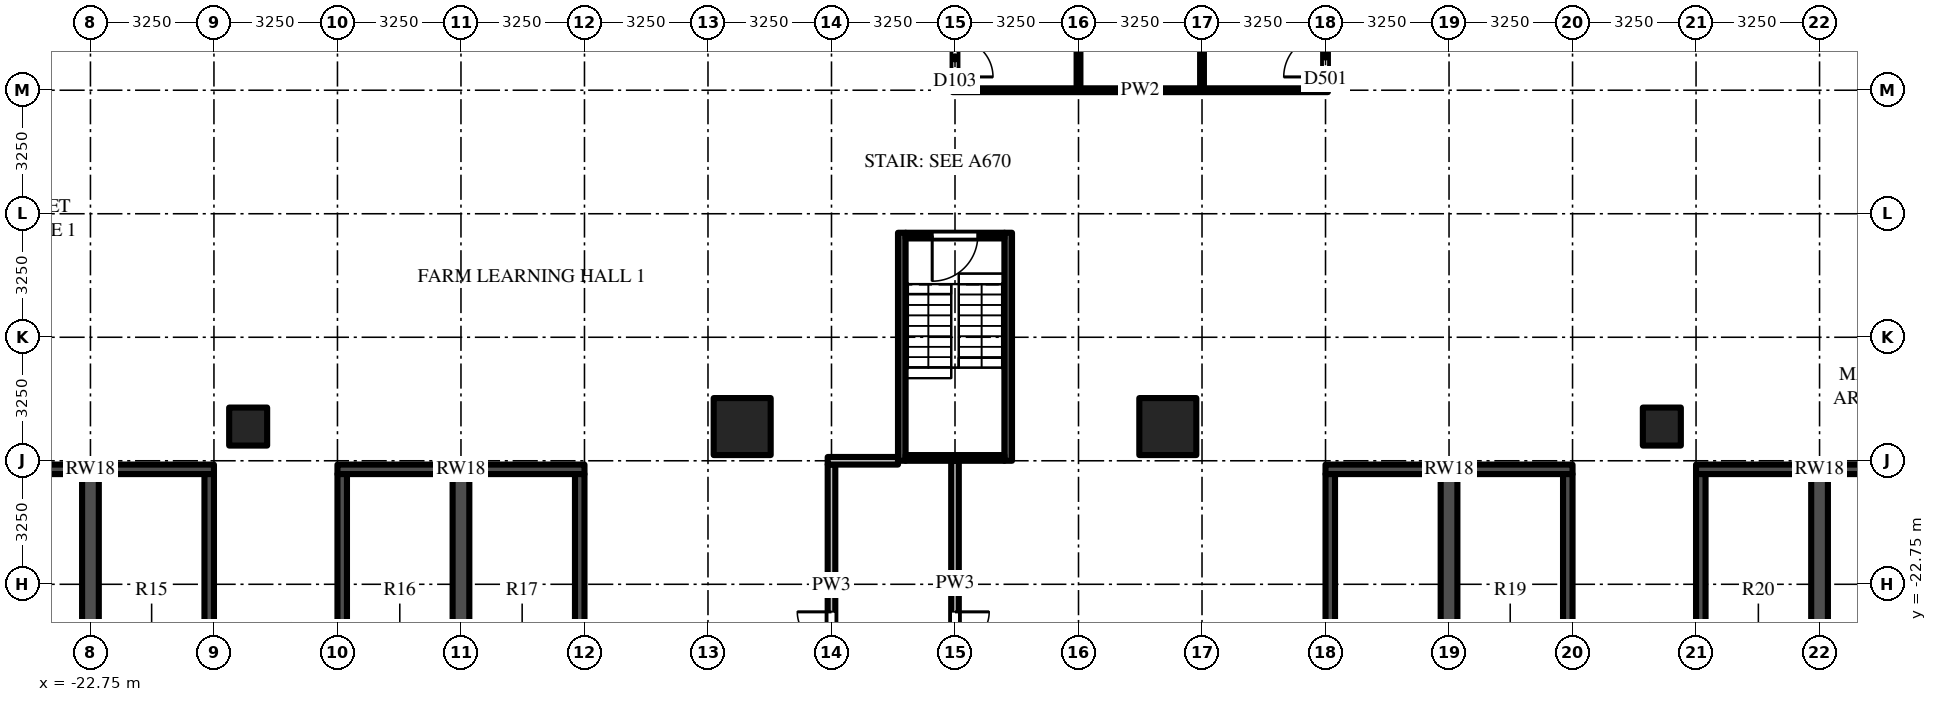
"""IFC4 building model, lengths in metres.
Left out: names, types, materials, properties, quantities, classifications, styles, units other than length and angle.
Written with IfcOpenShell. Run it as: python <this file> out.ifc"""

import sys

from ifc_helpers import new_model, si_unit, direction, frame, frame_2d, origin, origin_2d, place, context, subcontext, project, spatial, rectangle, extrude, source, transform, mapped, element, fill, save


model = new_model("IFC4")
c1 = context("Model", 3, precision=1e-05, world=origin(), true_north=direction((0.0, 1.0)))
c2 = subcontext(c1, "Body", "Model", "MODEL_VIEW")
j1 = project(units=[si_unit("LENGTHUNIT", "METRE"), si_unit("PLANEANGLEUNIT", "RADIAN")], contexts=[c1])
p1 = place(None, origin())
s1 = spatial("IfcSite", under=j1, at=p1, CompositionType="ELEMENT")
p2 = place(p1, origin())
s2 = spatial("IfcBuilding", under=s1, at=p2, CompositionType="ELEMENT")
p3 = place(p2, frame((0.0, 0.0, 29.0)))
s3 = spatial("IfcBuildingStorey", under=s2, at=p3, CompositionType="ELEMENT", Elevation=29.0)
m1 = source(origin(), c2, "Body", "SweptSolid", [
    extrude(rectangle(XDim=1.5, YDim=1.5, at=origin_2d()), origin(), (0.0, 0.0, 1.0), 5.0),
])
p4 = place(p3, frame((5.6, -18.6, 0.0), z_axis=(0.0, 0.0, 1.0), x_axis=(1.0, 0.0, 0.0)))
e1 = element("IfcColumn", 1, at=p4, inside=s3, PredefinedType="COLUMN", context=c2, shape_type="MappedRepresentation", body=[
    mapped(m1, transform((0.0, 0.0, 0.0))),
])
m2 = source(origin(), c2, "Body", "SweptSolid", [
    extrude(rectangle(XDim=1.0, YDim=1.0, at=origin_2d()), origin(), (0.0, 0.0, 1.0), 5.0),
])
p5 = place(p3, frame((18.6, -18.6, 0.0), z_axis=(0.0, 0.0, 1.0), x_axis=(1.0, 0.0, 0.0)))
e2 = element("IfcColumn", 2, at=p5, inside=s3, PredefinedType="COLUMN", context=c2, shape_type="MappedRepresentation", body=[
    mapped(m2, transform((0.0, 0.0, 0.0))),
])
p6 = place(p3, frame((-5.6, -18.6, 0.0), z_axis=(0.0, 0.0, 1.0), x_axis=(1.0, 0.0, 0.0)))
e3 = element("IfcColumn", 3, at=p6, inside=s3, PredefinedType="COLUMN", context=c2, shape_type="MappedRepresentation", body=[
    mapped(m1, transform((0.0, 0.0, 0.0))),
])
p7 = place(p3, frame((-18.6, -18.6, 0.0), z_axis=(0.0, 0.0, 1.0), x_axis=(1.0, 0.0, 0.0)))
e4 = element("IfcColumn", 4, at=p7, inside=s3, PredefinedType="COLUMN", context=c2, shape_type="MappedRepresentation", body=[
    mapped(m2, transform((0.0, 0.0, 0.0))),
])
m3 = source(origin(), c2, "Body", "SweptSolid", [
    extrude(rectangle(XDim=6.0, YDim=0.2, at=frame_2d((3.0, 0.0))), origin(), (0.0, 0.0, 1.0), 4.65),
])
for number, where, z_axis, x_axis in (
    (5, (1.4, -13.5, 0.0), (0.0, 0.0, 1.0), (0.0, -1.0, 0.0)),
    (6, (-1.4, -13.5, 0.0), (0.0, 0.0, 1.0), (0.0, -1.0, 0.0)),
):
    element("IfcWall", number, at=place(p3, frame(where, z_axis=z_axis, x_axis=x_axis)), inside=s3, PredefinedType="SHEAR", context=c2, shape_type="MappedRepresentation", body=[
        mapped(m3, transform((0.0, 0.0, 0.0))),
    ])
m4 = source(origin(), c2, "Body", "SweptSolid", [
    extrude(rectangle(XDim=2.6, YDim=0.15, at=frame_2d((1.3, 0.0))), origin(), (0.0, 0.0, 1.0), 4.65),
])
p8 = place(p3, frame((1.3, -13.575, 0.0), z_axis=(0.0, 0.0, 1.0), x_axis=(-1.0, 0.0, 0.0)))
e7 = element("IfcWall", 7, at=p8, inside=s3, PredefinedType="SHEAR", context=c2, shape_type="MappedRepresentation", body=[
    mapped(m4, transform((0.0, 0.0, 0.0))),
])
m5 = source(origin(), c2, "Body", "SweptSolid", [
    extrude(rectangle(XDim=1.2, YDim=2.1, at=frame_2d((0.6, 1.05))), frame((0.0, 0.085, 0.0), z_axis=(0.0, -1.0, 0.0), x_axis=(1.0, 0.0, 0.0)), (0.0, 0.0, 1.0), 0.17),
])
p9 = place(p8, frame((0.7, 0.0, 0.0)))
e8 = element("IfcOpeningElement", 8, at=p9, cuts=e7, PredefinedType="OPENING", context=c2, shape_type="MappedRepresentation", body=[
    mapped(m5, transform((0.0, 0.0, 0.0))),
])
p10 = place(p3, frame((1.3, -19.425, 0.0), z_axis=(0.0, 0.0, 1.0), x_axis=(-1.0, 0.0, 0.0)))
e9 = element("IfcWall", 9, at=p10, inside=s3, PredefinedType="SHEAR", context=c2, shape_type="MappedRepresentation", body=[
    mapped(m4, transform((0.0, 0.0, 0.0))),
])
m6 = source(origin(), c2, "Body", "SweptSolid", [
    extrude(rectangle(XDim=6.5, YDim=0.25, at=frame_2d((3.25, 0.0))), origin(), (0.0, 0.0, 1.0), 4.65),
])
p11 = place(p3, frame((-26.0, -19.725, 0.0), z_axis=(0.0, 0.0, 1.0), x_axis=(1.0, 0.0, 0.0)))
e10 = element("IfcWall", 10, at=p11, inside=s3, PredefinedType="SHEAR", context=c2, shape_type="MappedRepresentation", body=[
    mapped(m6, transform((0.0, 0.0, 0.0))),
])
m7 = source(origin(), c2, "Body", "SweptSolid", [
    extrude(rectangle(XDim=8.3, YDim=0.25, at=frame_2d((4.15, 0.0))), origin(), (0.0, 0.0, 1.0), 4.65),
])
p12 = place(p3, frame((-19.625, -28.15, 0.0), z_axis=(0.0, 0.0, 1.0), x_axis=(0.0, 1.0, 0.0)))
e11 = element("IfcWall", 11, at=p12, inside=s3, PredefinedType="SHEAR", context=c2, shape_type="MappedRepresentation", body=[
    mapped(m7, transform((0.0, 0.0, 0.0))),
])
m8 = source(origin(), c2, "Body", "SweptSolid", [
    extrude(rectangle(XDim=8.3, YDim=0.44, at=frame_2d((4.15, 0.0))), origin(), (0.0, 0.0, 1.0), 4.65),
])
p13 = place(p3, frame((-22.75, -28.15, 0.0), z_axis=(0.0, 0.0, 1.0), x_axis=(0.0, 1.0, 0.0)))
e12 = element("IfcWall", 12, at=p13, inside=s3, PredefinedType="SHEAR", context=c2, shape_type="MappedRepresentation", body=[
    mapped(m8, transform((0.0, 0.0, 0.0))),
])
p14 = place(p3, frame((-16.25, -19.725, 0.0), z_axis=(0.0, 0.0, 1.0), x_axis=(1.0, 0.0, 0.0)))
e13 = element("IfcWall", 13, at=p14, inside=s3, PredefinedType="SHEAR", context=c2, shape_type="MappedRepresentation", body=[
    mapped(m6, transform((0.0, 0.0, 0.0))),
])
for number, where, z_axis, x_axis in (
    (14, (-16.125, -28.15, 0.0), (0.0, 0.0, 1.0), (0.0, 1.0, 0.0)),
    (15, (-9.875, -28.15, 0.0), (0.0, 0.0, 1.0), (0.0, 1.0, 0.0)),
):
    element("IfcWall", number, at=place(p3, frame(where, z_axis=z_axis, x_axis=x_axis)), inside=s3, PredefinedType="SHEAR", context=c2, shape_type="MappedRepresentation", body=[
        mapped(m7, transform((0.0, 0.0, 0.0))),
    ])
p15 = place(p3, frame((-13.0, -28.15, 0.0), z_axis=(0.0, 0.0, 1.0), x_axis=(0.0, 1.0, 0.0)))
e16 = element("IfcWall", 16, at=p15, inside=s3, PredefinedType="SHEAR", context=c2, shape_type="MappedRepresentation", body=[
    mapped(m8, transform((0.0, 0.0, 0.0))),
])
p16 = place(p3, frame((9.75, -19.725, 0.0), z_axis=(0.0, 0.0, 1.0), x_axis=(1.0, 0.0, 0.0)))
e17 = element("IfcWall", 17, at=p16, inside=s3, PredefinedType="SHEAR", context=c2, shape_type="MappedRepresentation", body=[
    mapped(m6, transform((0.0, 0.0, 0.0))),
])
for number, where, z_axis, x_axis in (
    (18, (9.875, -28.15, 0.0), (0.0, 0.0, 1.0), (0.0, 1.0, 0.0)),
    (19, (16.125, -28.15, 0.0), (0.0, 0.0, 1.0), (0.0, 1.0, 0.0)),
):
    element("IfcWall", number, at=place(p3, frame(where, z_axis=z_axis, x_axis=x_axis)), inside=s3, PredefinedType="SHEAR", context=c2, shape_type="MappedRepresentation", body=[
        mapped(m7, transform((0.0, 0.0, 0.0))),
    ])
p17 = place(p3, frame((13.0, -28.15, 0.0), z_axis=(0.0, 0.0, 1.0), x_axis=(0.0, 1.0, 0.0)))
e20 = element("IfcWall", 20, at=p17, inside=s3, PredefinedType="SHEAR", context=c2, shape_type="MappedRepresentation", body=[
    mapped(m8, transform((0.0, 0.0, 0.0))),
])
p18 = place(p3, frame((19.5, -19.725, 0.0), z_axis=(0.0, 0.0, 1.0), x_axis=(1.0, 0.0, 0.0)))
e21 = element("IfcWall", 21, at=p18, inside=s3, PredefinedType="SHEAR", context=c2, shape_type="MappedRepresentation", body=[
    mapped(m6, transform((0.0, 0.0, 0.0))),
])
p19 = place(p3, frame((19.625, -28.15, 0.0), z_axis=(0.0, 0.0, 1.0), x_axis=(0.0, 1.0, 0.0)))
e22 = element("IfcWall", 22, at=p19, inside=s3, PredefinedType="SHEAR", context=c2, shape_type="MappedRepresentation", body=[
    mapped(m7, transform((0.0, 0.0, 0.0))),
])
p20 = place(p3, frame((22.75, -28.15, 0.0), z_axis=(0.0, 0.0, 1.0), x_axis=(0.0, 1.0, 0.0)))
e23 = element("IfcWall", 23, at=p20, inside=s3, PredefinedType="SHEAR", context=c2, shape_type="MappedRepresentation", body=[
    mapped(m8, transform((0.0, 0.0, 0.0))),
])
m9 = source(origin(), c2, "Body", "SweptSolid", [
    extrude(rectangle(XDim=3.188, YDim=0.2, at=frame_2d((1.594, 0.0))), origin(), (0.0, 0.0, 1.0), 4.65),
])
p21 = place(p3, frame((-3.25, -25.938, 0.0), z_axis=(0.0, 0.0, 1.0), x_axis=(0.0, 1.0, 0.0)))
e24 = element("IfcWall", 24, at=p21, inside=s3, PredefinedType="PARTITIONING", context=c2, shape_type="MappedRepresentation", body=[
    mapped(m9, transform((0.0, 0.0, 0.0))),
])
m10 = source(origin(), c2, "Body", "SweptSolid", [
    extrude(rectangle(XDim=1.8, YDim=2.1, at=frame_2d((0.9, 1.05))), frame((0.0, 0.11, 0.0), z_axis=(0.0, -1.0, 0.0), x_axis=(1.0, 0.0, 0.0)), (0.0, 0.0, 1.0), 0.22),
])
p22 = place(p21, frame((0.663, 0.0, 0.0)))
e25 = element("IfcOpeningElement", 25, at=p22, cuts=e24, PredefinedType="OPENING", context=c2, shape_type="MappedRepresentation", body=[
    mapped(m10, transform((0.0, 0.0, 0.0))),
])
m11 = source(origin(), c2, "Body", "SweptSolid", [
    extrude(rectangle(XDim=3.15, YDim=0.2, at=frame_2d((1.575, 0.0))), origin(), (0.0, 0.0, 1.0), 4.65),
])
p23 = place(p3, frame((-3.25, -22.75, 0.0), z_axis=(0.0, 0.0, 1.0), x_axis=(0.0, 1.0, 0.0)))
e26 = element("IfcWall", 26, at=p23, inside=s3, PredefinedType="PARTITIONING", context=c2, shape_type="MappedRepresentation", body=[
    mapped(m11, transform((0.0, 0.0, 0.0))),
])
m12 = source(origin(), c2, "Body", "SweptSolid", [
    extrude(rectangle(XDim=3.188, YDim=0.2, at=frame_2d((1.594, 0.0))), origin(), (0.0, 0.0, 1.0), 3.947),
])
p24 = place(p3, frame((0.0, -22.75, 0.0), z_axis=(0.0, 0.0, 1.0), x_axis=(0.0, -1.0, 0.0)))
e27 = element("IfcWall", 27, at=p24, inside=s3, PredefinedType="PARTITIONING", context=c2, shape_type="MappedRepresentation", body=[
    mapped(m12, transform((0.0, 0.0, 0.0))),
])
p25 = place(p24, frame((0.725, 0.0, 0.0)))
e28 = element("IfcOpeningElement", 28, at=p25, cuts=e27, PredefinedType="OPENING", context=c2, shape_type="MappedRepresentation", body=[
    mapped(m10, transform((0.0, 0.0, 0.0))),
])
m13 = source(origin(), c2, "Body", "SweptSolid", [
    extrude(rectangle(XDim=3.25, YDim=0.2, at=frame_2d((1.625, 0.0))), origin(), (0.0, 0.0, 1.0), 3.947),
])
p26 = place(p3, frame((0.0, -22.75, 0.0), z_axis=(0.0, 0.0, 1.0), x_axis=(0.0, 1.0, 0.0)))
e29 = element("IfcWall", 29, at=p26, inside=s3, PredefinedType="PARTITIONING", context=c2, shape_type="MappedRepresentation", body=[
    mapped(m13, transform((0.0, 0.0, 0.0))),
])
p27 = place(p3, frame((0.0, -6.562, 0.0), z_axis=(0.0, 0.0, 1.0), x_axis=(0.0, -1.0, 0.0)))
e30 = element("IfcWall", 30, at=p27, inside=s3, PredefinedType="PARTITIONING", context=c2, shape_type="SweptSolid", body=[
    extrude(rectangle(XDim=3.137, YDim=0.125, at=frame_2d((1.569, 0.0))), origin(), (0.0, 0.0, 1.0), 4.027),
])
m14 = source(origin(), c2, "Body", "SweptSolid", [
    extrude(rectangle(XDim=1.0, YDim=2.1, at=frame_2d((0.5, 1.05))), frame((0.0, 0.073, 0.0), z_axis=(0.0, -1.0, 0.0), x_axis=(1.0, 0.0, 0.0)), (0.0, 0.0, 1.0), 0.145),
])
p28 = place(p27, frame((1.837, 0.0, 0.0)))
e31 = element("IfcOpeningElement", 31, at=p28, cuts=e30, PredefinedType="OPENING", context=c2, shape_type="MappedRepresentation", body=[
    mapped(m14, transform((0.0, 0.0, 0.0))),
])
p29 = place(p3, frame((3.25, -9.7, 0.0), z_axis=(0.0, 0.0, 1.0), x_axis=(0.0, 1.0, 0.0)))
e32 = element("IfcWall", 32, at=p29, inside=s3, PredefinedType="PARTITIONING", context=c2, shape_type="SweptSolid", body=[
    extrude(rectangle(XDim=3.137, YDim=0.1, at=frame_2d((1.569, 0.0))), origin(), (0.0, 0.0, 1.0), 4.65),
])
p30 = place(p3, frame((6.5, -9.7, 0.0), z_axis=(0.0, 0.0, 1.0), x_axis=(0.0, 1.0, 0.0)))
e33 = element("IfcWall", 33, at=p30, inside=s3, PredefinedType="PARTITIONING", context=c2, shape_type="SweptSolid", body=[
    extrude(rectangle(XDim=3.137, YDim=0.1, at=frame_2d((1.569, 0.0))), origin(), (0.0, 0.0, 1.0), 3.947),
])
p31 = place(p3, frame((9.75, -9.7, 0.0), z_axis=(0.0, 0.0, 1.0), x_axis=(0.0, 1.0, 0.0)))
e34 = element("IfcWall", 34, at=p31, inside=s3, PredefinedType="PARTITIONING", context=c2, shape_type="SweptSolid", body=[
    extrude(rectangle(XDim=3.2, YDim=0.125, at=frame_2d((1.6, 0.0))), origin(), (0.0, 0.0, 1.0), 3.947),
])
m15 = source(origin(), c2, "Body", "SweptSolid", [
    extrude(rectangle(XDim=1.1, YDim=2.1, at=frame_2d((0.55, 1.05))), frame((0.0, 0.073, 0.0), z_axis=(0.0, -1.0, 0.0), x_axis=(1.0, 0.0, 0.0)), (0.0, 0.0, 1.0), 0.145),
])
p32 = place(p31, frame((0.3, 0.0, 0.0)))
e35 = element("IfcOpeningElement", 35, at=p32, cuts=e34, PredefinedType="OPENING", context=c2, shape_type="MappedRepresentation", body=[
    mapped(m15, transform((0.0, 0.0, 0.0))),
])
m16 = source(origin(), c2, "Body", "SweptSolid", [
    extrude(rectangle(XDim=1.85, YDim=0.2, at=frame_2d((0.925, 0.0))), origin(), (0.0, 0.0, 1.0), 3.947),
])
p33 = place(p3, frame((-3.35, -19.5, 0.0), z_axis=(0.0, 0.0, 1.0), x_axis=(1.0, 0.0, 0.0)))
e36 = element("IfcWall", 36, at=p33, inside=s3, PredefinedType="PARTITIONING", context=c2, shape_type="MappedRepresentation", body=[
    mapped(m16, transform((0.0, 0.0, 0.0))),
])
p34 = place(p3, frame((-0.062, -9.75, 0.0), z_axis=(0.0, 0.0, 1.0), x_axis=(1.0, 0.0, 0.0)))
e37 = element("IfcWall", 37, at=p34, inside=s3, PredefinedType="PARTITIONING", context=c2, shape_type="SweptSolid", body=[
    extrude(rectangle(XDim=9.875, YDim=0.1, at=frame_2d((4.938, 0.0))), origin(), (0.0, 0.0, 1.0), 2.83),
])
m17 = source(origin(), c2, "Body", "SweptSolid", [
    extrude(rectangle(XDim=1.2, YDim=2.1, at=frame_2d((0.6, 1.05))), frame((0.0, 0.025, 0.0), z_axis=(0.0, -1.0, 0.0), x_axis=(1.0, 0.0, 0.0)), (0.0, 0.0, 1.0), 0.05),
])
p35 = place(p9, origin())
e38 = element("IfcDoor", 38, at=p35, inside=s3, OperationType="SINGLE_SWING_RIGHT", PredefinedType="DOOR", context=c2, shape_type="MappedRepresentation", body=[
    mapped(m17, transform((0.0, 0.0, 0.0))),
])
fill(e8, e38)
m18 = source(origin(), c2, "Body", "SweptSolid", [
    extrude(rectangle(XDim=1.8, YDim=2.1, at=frame_2d((0.9, 1.05))), frame((0.0, 0.025, 0.0), z_axis=(0.0, -1.0, 0.0), x_axis=(1.0, 0.0, 0.0)), (0.0, 0.0, 1.0), 0.05),
])
p36 = place(p22, origin())
e39 = element("IfcDoor", 39, at=p36, inside=s3, OperationType="DOUBLE_DOOR_SINGLE_SWING", PredefinedType="DOOR", context=c2, shape_type="MappedRepresentation", body=[
    mapped(m18, transform((0.0, 0.0, 0.0))),
])
fill(e25, e39)
p37 = place(p25, origin())
e40 = element("IfcDoor", 40, at=p37, inside=s3, OperationType="DOUBLE_DOOR_SINGLE_SWING", PredefinedType="DOOR", context=c2, shape_type="MappedRepresentation", body=[
    mapped(m18, transform((0.0, 0.0, 0.0))),
])
fill(e28, e40)
m19 = source(origin(), c2, "Body", "SweptSolid", [
    extrude(rectangle(XDim=1.0, YDim=2.1, at=frame_2d((0.5, 1.05))), frame((0.0, 0.025, 0.0), z_axis=(0.0, -1.0, 0.0), x_axis=(1.0, 0.0, 0.0)), (0.0, 0.0, 1.0), 0.05),
])
p38 = place(p28, origin())
e41 = element("IfcDoor", 41, at=p38, inside=s3, OperationType="SINGLE_SWING_RIGHT", PredefinedType="DOOR", context=c2, shape_type="MappedRepresentation", body=[
    mapped(m19, transform((0.0, 0.0, 0.0))),
])
fill(e31, e41)
m20 = source(origin(), c2, "Body", "SweptSolid", [
    extrude(rectangle(XDim=1.1, YDim=2.1, at=frame_2d((0.55, 1.05))), frame((0.0, 0.025, 0.0), z_axis=(0.0, -1.0, 0.0), x_axis=(1.0, 0.0, 0.0)), (0.0, 0.0, 1.0), 0.05),
])
p39 = place(p32, origin())
e42 = element("IfcDoor", 42, at=p39, inside=s3, OperationType="SINGLE_SWING_LEFT", PredefinedType="DOOR", context=c2, shape_type="MappedRepresentation", body=[
    mapped(m20, transform((0.0, 0.0, 0.0))),
])
fill(e35, e42)
save(model, sys.argv[1])
